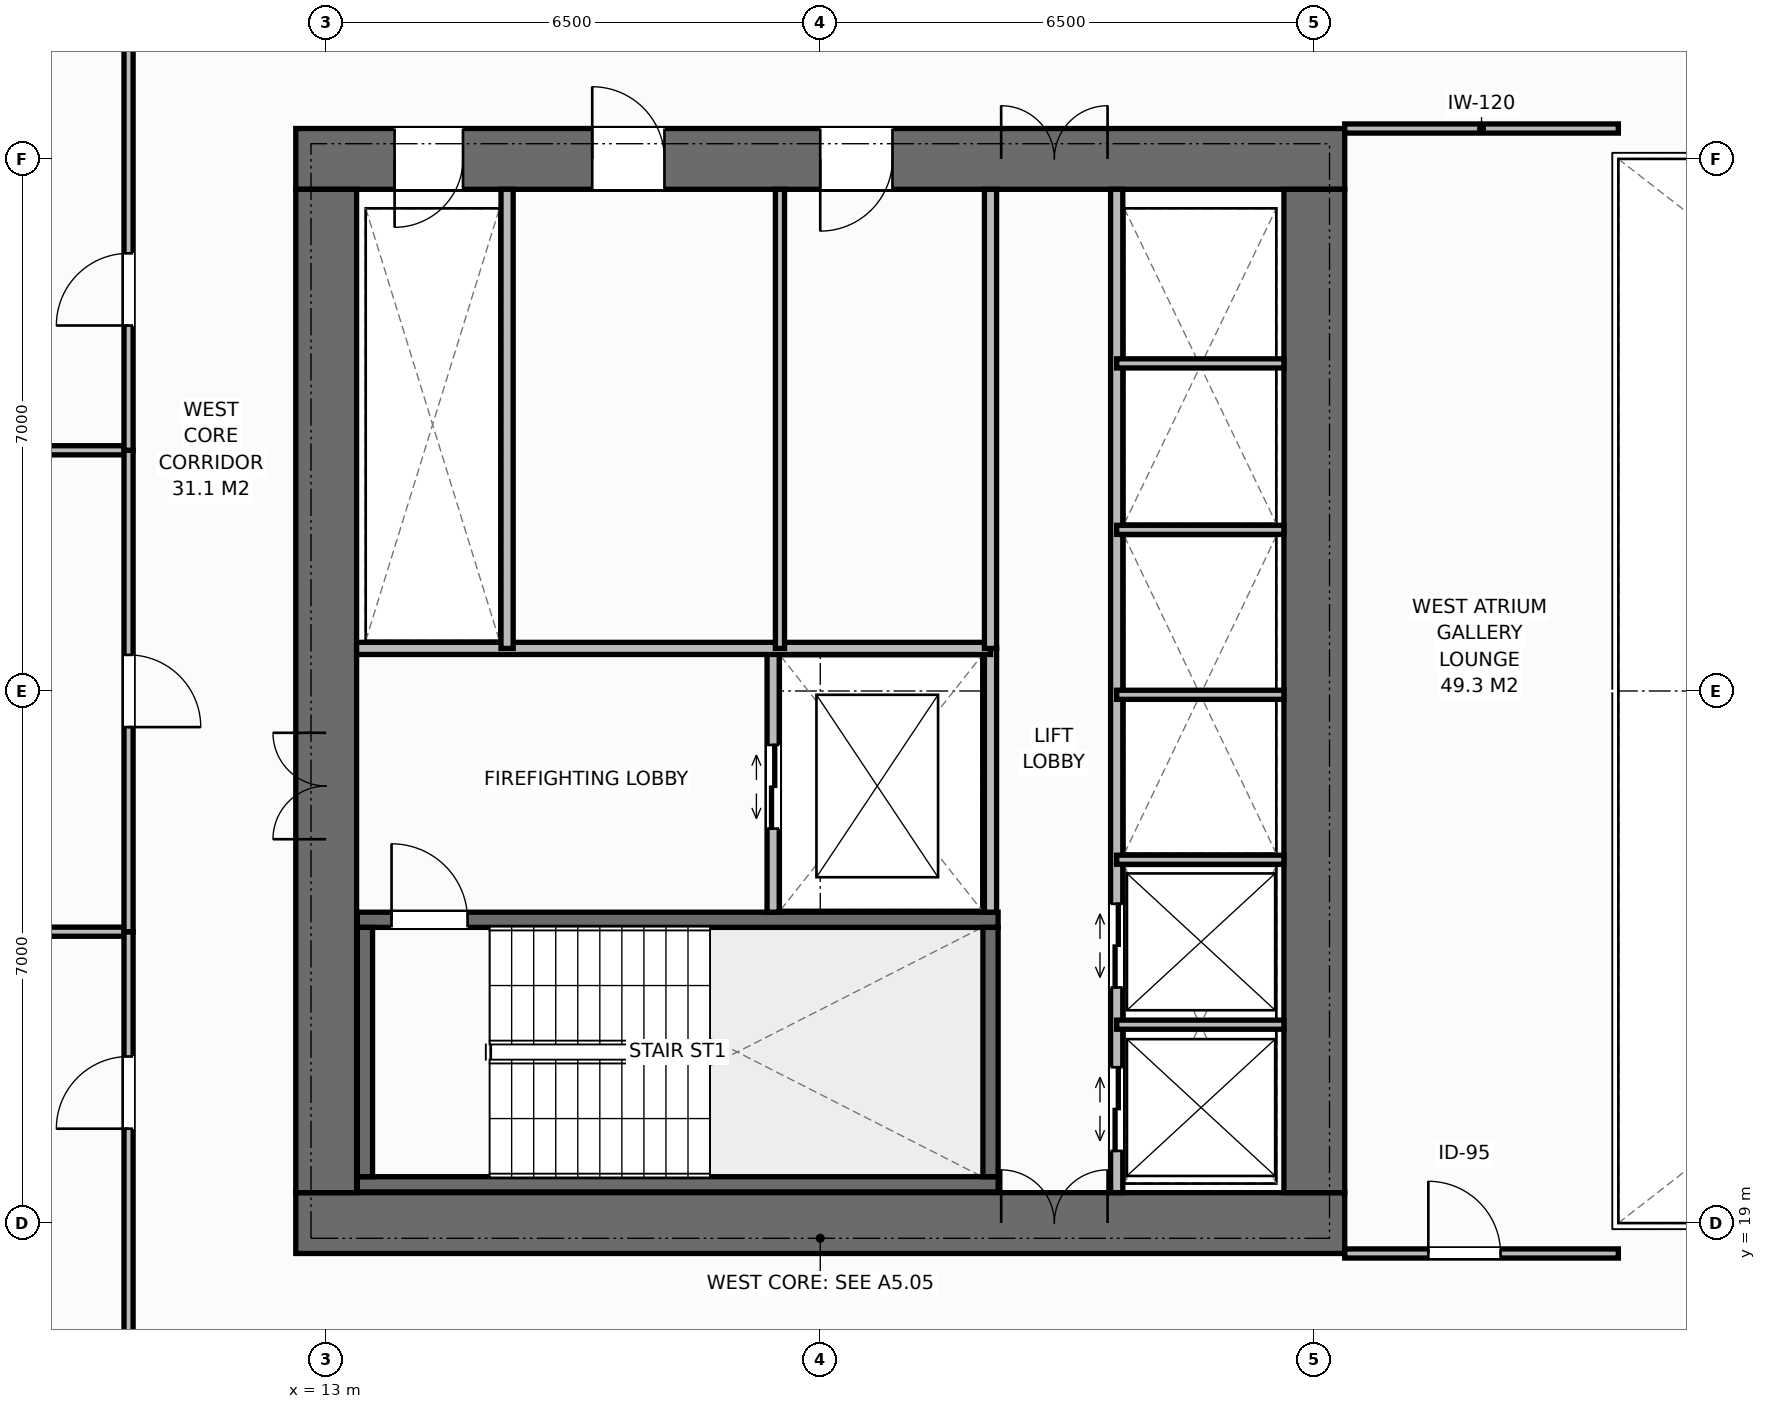
"""IFC4 building model, lengths in metres.
Left out: names, types, materials, properties, quantities, classifications, styles, units other than length and angle.
Written with IfcOpenShell. Run it as: python <this file> out.ifc"""

import sys

from ifc_helpers import new_model, si_unit, direction, frame, frame_2d, origin, place, context, subcontext, project, spatial, rectangle, extrude, element, fill, save


model = new_model("IFC4")
c1 = context("Model", 3, precision=1e-05, world=origin(), true_north=direction((0.0, 1.0)))
c2 = subcontext(c1, "Body", "Model", "MODEL_VIEW")
j1 = project(units=[si_unit("LENGTHUNIT", "METRE"), si_unit("PLANEANGLEUNIT", "RADIAN")], contexts=[c1])
p1 = place(None, origin())
s1 = spatial("IfcSite", under=j1, at=p1, CompositionType="ELEMENT")
p2 = place(p1, origin())
s2 = spatial("IfcBuilding", under=s1, at=p2, CompositionType="ELEMENT")
p3 = place(p2, frame((0.0, 0.0, 54.4)))
s3 = spatial("IfcBuildingStorey", under=s2, at=p3, CompositionType="ELEMENT", Elevation=54.4)
p4 = place(p3, frame((12.6, 19.0, 0.0), z_axis=(0.0, 0.0, 1.0), x_axis=(1.0, 0.0, 0.0)))
e1 = element("IfcWall", 1, at=p4, inside=s3, PredefinedType="SHEAR", context=c2, shape_type="SweptSolid", body=[
    extrude(rectangle(XDim=13.8, YDim=0.8, at=frame_2d((6.9, 0.0))), origin(), (0.0, 0.0, 1.0), 3.8),
])
p5 = place(p4, frame((9.28, 0.0, 0.0)))
e2 = element("IfcOpeningElement", 2, at=p5, cuts=e1, PredefinedType="OPENING", context=c2, shape_type="SweptSolid", body=[
    extrude(rectangle(XDim=1.4, YDim=2.2, at=frame_2d((0.7, 1.1))), frame((0.0, 0.41, 0.0), z_axis=(0.0, -1.0, 0.0), x_axis=(1.0, 0.0, 0.0)), (0.0, 0.0, 1.0), 0.82),
])
p6 = place(p3, frame((12.6, 33.0, 0.0), z_axis=(0.0, 0.0, 1.0), x_axis=(1.0, 0.0, 0.0)))
e3 = element("IfcWall", 3, at=p6, inside=s3, PredefinedType="SHEAR", context=c2, shape_type="SweptSolid", body=[
    extrude(rectangle(XDim=13.8, YDim=0.8, at=frame_2d((6.9, 0.0))), origin(), (0.0, 0.0, 1.0), 3.8),
])
p7 = place(p6, frame((1.3, 0.0, 0.0)))
e4 = element("IfcOpeningElement", 4, at=p7, cuts=e3, PredefinedType="OPENING", context=c2, shape_type="SweptSolid", body=[
    extrude(rectangle(XDim=0.9, YDim=2.15, at=frame_2d((0.45, 1.075))), frame((0.0, 0.41, 0.0), z_axis=(0.0, -1.0, 0.0), x_axis=(1.0, 0.0, 0.0)), (0.0, 0.0, 1.0), 0.82),
])
p8 = place(p6, frame((3.9, 0.0, 0.0)))
e5 = element("IfcOpeningElement", 5, at=p8, cuts=e3, PredefinedType="OPENING", context=c2, shape_type="SweptSolid", body=[
    extrude(rectangle(XDim=0.95, YDim=2.15, at=frame_2d((0.475, 1.075))), frame((0.0, 0.41, 0.0), z_axis=(0.0, -1.0, 0.0), x_axis=(1.0, 0.0, 0.0)), (0.0, 0.0, 1.0), 0.82),
])
p9 = place(p6, frame((6.9, 0.0, 0.0)))
e6 = element("IfcOpeningElement", 6, at=p9, cuts=e3, PredefinedType="OPENING", context=c2, shape_type="SweptSolid", body=[
    extrude(rectangle(XDim=0.95, YDim=2.15, at=frame_2d((0.475, 1.075))), frame((0.0, 0.41, 0.0), z_axis=(0.0, -1.0, 0.0), x_axis=(1.0, 0.0, 0.0)), (0.0, 0.0, 1.0), 0.82),
])
p10 = place(p6, frame((9.28, 0.0, 0.0)))
e7 = element("IfcOpeningElement", 7, at=p10, cuts=e3, PredefinedType="OPENING", context=c2, shape_type="SweptSolid", body=[
    extrude(rectangle(XDim=1.4, YDim=2.2, at=frame_2d((0.7, 1.1))), frame((0.0, 0.41, 0.0), z_axis=(0.0, -1.0, 0.0), x_axis=(1.0, 0.0, 0.0)), (0.0, 0.0, 1.0), 0.82),
])
p11 = place(p3, frame((13.0, 19.4, 0.0), z_axis=(0.0, 0.0, 1.0), x_axis=(0.0, 1.0, 0.0)))
e8 = element("IfcWall", 8, at=p11, inside=s3, PredefinedType="SHEAR", context=c2, shape_type="SweptSolid", body=[
    extrude(rectangle(XDim=13.2, YDim=0.8, at=frame_2d((6.6, 0.0))), origin(), (0.0, 0.0, 1.0), 3.8),
])
p12 = place(p11, frame((4.65, 0.0, 0.0)))
e9 = element("IfcOpeningElement", 9, at=p12, cuts=e8, PredefinedType="OPENING", context=c2, shape_type="SweptSolid", body=[
    extrude(rectangle(XDim=1.4, YDim=2.2, at=frame_2d((0.7, 1.1))), frame((0.0, 0.41, 0.0), z_axis=(0.0, -1.0, 0.0), x_axis=(1.0, 0.0, 0.0)), (0.0, 0.0, 1.0), 0.82),
])
p13 = place(p3, frame((26.0, 19.4, 0.0), z_axis=(0.0, 0.0, 1.0), x_axis=(0.0, 1.0, 0.0)))
e10 = element("IfcWall", 10, at=p13, inside=s3, PredefinedType="SHEAR", context=c2, shape_type="SweptSolid", body=[
    extrude(rectangle(XDim=13.2, YDim=0.8, at=frame_2d((6.6, 0.0))), origin(), (0.0, 0.0, 1.0), 3.8),
])
p14 = place(p3, frame((13.41, 19.51, 0.0), z_axis=(0.0, 0.0, 1.0), x_axis=(1.0, 0.0, 0.0)))
e11 = element("IfcWall", 11, at=p14, inside=s3, PredefinedType="SHEAR", context=c2, shape_type="SweptSolid", body=[
    extrude(rectangle(XDim=8.43, YDim=0.2, at=frame_2d((4.215, 0.0))), origin(), (0.0, 0.0, 1.0), 3.8),
])
p15 = place(p3, frame((13.41, 22.99, 0.0), z_axis=(0.0, 0.0, 1.0), x_axis=(1.0, 0.0, 0.0)))
e12 = element("IfcWall", 12, at=p15, inside=s3, PredefinedType="SHEAR", context=c2, shape_type="SweptSolid", body=[
    extrude(rectangle(XDim=8.43, YDim=0.2, at=frame_2d((4.215, 0.0))), origin(), (0.0, 0.0, 1.0), 3.8),
])
p16 = place(p15, frame((0.45, 0.0, 0.0)))
e13 = element("IfcOpeningElement", 13, at=p16, cuts=e12, PredefinedType="OPENING", context=c2, shape_type="SweptSolid", body=[
    extrude(rectangle(XDim=1.0, YDim=2.15, at=frame_2d((0.5, 1.075))), frame((0.0, 0.11, 0.0), z_axis=(0.0, -1.0, 0.0), x_axis=(1.0, 0.0, 0.0)), (0.0, 0.0, 1.0), 0.22),
])
for number, where, z_axis, x_axis in (
    (14, (13.51, 19.61, 0.0), (0.0, 0.0, 1.0), (0.0, 1.0, 0.0)),
    (15, (21.74, 19.61, 0.0), (0.0, 0.0, 1.0), (0.0, 1.0, 0.0)),
):
    element("IfcWall", number, at=place(p3, frame(where, z_axis=z_axis, x_axis=x_axis)), inside=s3, PredefinedType="SHEAR", context=c2, shape_type="SweptSolid", body=[
        extrude(rectangle(XDim=3.28, YDim=0.2, at=frame_2d((1.64, 0.0))), origin(), (0.0, 0.0, 1.0), 3.8),
    ])
p17 = place(p3, frame((21.74, 23.09, 0.0), z_axis=(0.0, 0.0, 1.0), x_axis=(0.0, 1.0, 0.0)))
e16 = element("IfcWall", 16, at=p17, inside=s3, PredefinedType="STANDARD", context=c2, shape_type="SweptSolid", body=[
    extrude(rectangle(XDim=3.47, YDim=0.16, at=frame_2d((1.735, 0.0))), origin(), (0.0, 0.0, 1.0), 3.55),
])
p18 = place(p3, frame((18.88, 23.09, 0.0), z_axis=(0.0, 0.0, 1.0), x_axis=(0.0, 1.0, 0.0)))
e17 = element("IfcWall", 17, at=p18, inside=s3, PredefinedType="STANDARD", context=c2, shape_type="SweptSolid", body=[
    extrude(rectangle(XDim=3.47, YDim=0.16, at=frame_2d((1.735, 0.0))), origin(), (0.0, 0.0, 1.0), 3.55),
])
p19 = place(p18, frame((1.1, 0.0, 0.0)))
e18 = element("IfcOpeningElement", 18, at=p19, cuts=e17, PredefinedType="OPENING", context=c2, shape_type="SweptSolid", body=[
    extrude(rectangle(XDim=1.1, YDim=2.2, at=frame_2d((0.55, 1.1))), frame((0.0, 0.09, 0.0), z_axis=(0.0, -1.0, 0.0), x_axis=(1.0, 0.0, 0.0)), (0.0, 0.0, 1.0), 0.18),
])
p20 = place(p3, frame((13.4, 26.56, 0.0), z_axis=(0.0, 0.0, 1.0), x_axis=(1.0, 0.0, 0.0)))
e19 = element("IfcWall", 19, at=p20, inside=s3, PredefinedType="STANDARD", context=c2, shape_type="SweptSolid", body=[
    extrude(rectangle(XDim=8.34, YDim=0.16, at=frame_2d((4.17, 0.0))), origin(), (0.0, 0.0, 1.0), 3.55),
])
p21 = place(p3, frame((15.38, 26.56, 0.0), z_axis=(0.0, 0.0, 1.0), x_axis=(0.0, 1.0, 0.0)))
e20 = element("IfcWall", 20, at=p21, inside=s3, PredefinedType="STANDARD", context=c2, shape_type="SweptSolid", body=[
    extrude(rectangle(XDim=6.04, YDim=0.16, at=frame_2d((3.02, 0.0))), origin(), (0.0, 0.0, 1.0), 3.55),
])
p22 = place(p3, frame((18.97, 26.56, 0.0), z_axis=(0.0, 0.0, 1.0), x_axis=(0.0, 1.0, 0.0)))
e21 = element("IfcWall", 21, at=p22, inside=s3, PredefinedType="PARTITIONING", context=c2, shape_type="SweptSolid", body=[
    extrude(rectangle(XDim=6.04, YDim=0.12, at=frame_2d((3.02, 0.0))), origin(), (0.0, 0.0, 1.0), 3.55),
])
p23 = place(p3, frame((21.74, 26.56, 0.0), z_axis=(0.0, 0.0, 1.0), x_axis=(0.0, 1.0, 0.0)))
e22 = element("IfcWall", 22, at=p23, inside=s3, PredefinedType="STANDARD", context=c2, shape_type="SweptSolid", body=[
    extrude(rectangle(XDim=6.04, YDim=0.16, at=frame_2d((3.02, 0.0))), origin(), (0.0, 0.0, 1.0), 3.55),
])
p24 = place(p3, frame((23.4, 19.4, 0.0), z_axis=(0.0, 0.0, 1.0), x_axis=(0.0, 1.0, 0.0)))
e23 = element("IfcWall", 23, at=p24, inside=s3, PredefinedType="STANDARD", context=c2, shape_type="SweptSolid", body=[
    extrude(rectangle(XDim=13.2, YDim=0.16, at=frame_2d((6.6, 0.0))), origin(), (0.0, 0.0, 1.0), 3.55),
])
p25 = place(p24, frame((0.55, 0.0, 0.0)))
e24 = element("IfcOpeningElement", 24, at=p25, cuts=e23, PredefinedType="OPENING", context=c2, shape_type="SweptSolid", body=[
    extrude(rectangle(XDim=1.1, YDim=2.2, at=frame_2d((0.55, 1.1))), frame((0.0, 0.09, 0.0), z_axis=(0.0, -1.0, 0.0), x_axis=(1.0, 0.0, 0.0)), (0.0, 0.0, 1.0), 0.18),
])
p26 = place(p24, frame((2.7, 0.0, 0.0)))
e25 = element("IfcOpeningElement", 25, at=p26, cuts=e23, PredefinedType="OPENING", context=c2, shape_type="SweptSolid", body=[
    extrude(rectangle(XDim=1.1, YDim=2.2, at=frame_2d((0.55, 1.1))), frame((0.0, 0.09, 0.0), z_axis=(0.0, -1.0, 0.0), x_axis=(1.0, 0.0, 0.0)), (0.0, 0.0, 1.0), 0.18),
])
for number, where, z_axis, x_axis in (
    (26, (23.4, 21.61, 0.0), (0.0, 0.0, 1.0), (1.0, 0.0, 0.0)),
    (27, (23.4, 23.78, 0.0), (0.0, 0.0, 1.0), (1.0, 0.0, 0.0)),
    (28, (23.4, 25.95, 0.0), (0.0, 0.0, 1.0), (1.0, 0.0, 0.0)),
    (29, (23.4, 28.12, 0.0), (0.0, 0.0, 1.0), (1.0, 0.0, 0.0)),
    (30, (23.4, 30.31, 0.0), (0.0, 0.0, 1.0), (1.0, 0.0, 0.0)),
):
    element("IfcWall", number, at=place(p3, frame(where, z_axis=z_axis, x_axis=x_axis)), inside=s3, PredefinedType="PARTITIONING", context=c2, shape_type="SweptSolid", body=[
        extrude(rectangle(XDim=2.2, YDim=0.12, at=frame_2d((1.1, 0.0))), origin(), (0.0, 0.0, 1.0), 3.55),
    ])
p27 = place(p3, frame((26.4, 33.4, 0.0), z_axis=(0.0, 0.0, 1.0), x_axis=(1.0, 0.0, 0.0)))
e31 = element("IfcWall", 31, at=p27, inside=s3, PredefinedType="PARTITIONING", context=c2, shape_type="SweptSolid", body=[
    extrude(rectangle(XDim=3.6, YDim=0.12, at=frame_2d((1.8, 0.0))), origin(), (0.0, 0.0, 1.0), 3.55),
])
p28 = place(p3, frame((26.4, 18.6, 0.0), z_axis=(0.0, 0.0, 1.0), x_axis=(1.0, 0.0, 0.0)))
e32 = element("IfcWall", 32, at=p28, inside=s3, PredefinedType="PARTITIONING", context=c2, shape_type="SweptSolid", body=[
    extrude(rectangle(XDim=3.6, YDim=0.12, at=frame_2d((1.8, 0.0))), origin(), (0.0, 0.0, 1.0), 3.55),
])
p29 = place(p28, frame((1.1, 0.0, 0.0)))
e33 = element("IfcOpeningElement", 33, at=p29, cuts=e32, PredefinedType="OPENING", context=c2, shape_type="SweptSolid", body=[
    extrude(rectangle(XDim=0.95, YDim=2.15, at=frame_2d((0.475, 1.075))), frame((0.0, 0.07, 0.0), z_axis=(0.0, -1.0, 0.0), x_axis=(1.0, 0.0, 0.0)), (0.0, 0.0, 1.0), 0.14),
])
p30 = place(p3, frame((-0.18, 22.833, 0.0), z_axis=(0.0, 0.0, 1.0), x_axis=(1.0, 0.0, 0.0)))
e34 = element("IfcWall", 34, at=p30, inside=s3, PredefinedType="PARTITIONING", context=c2, shape_type="SweptSolid", body=[
    extrude(rectangle(XDim=10.58, YDim=0.12, at=frame_2d((5.29, 0.0))), origin(), (0.0, 0.0, 1.0), 3.55),
])
p31 = place(p3, frame((10.4, 16.5, 0.0), z_axis=(0.0, 0.0, 1.0), x_axis=(0.0, 1.0, 0.0)))
e35 = element("IfcWall", 35, at=p31, inside=s3, PredefinedType="PARTITIONING", context=c2, shape_type="SweptSolid", body=[
    extrude(rectangle(XDim=6.333, YDim=0.12, at=frame_2d((3.167, 0.0))), origin(), (0.0, 0.0, 1.0), 3.55),
])
p32 = place(p31, frame((3.742, 0.0, 0.0)))
e36 = element("IfcOpeningElement", 36, at=p32, cuts=e35, PredefinedType="OPENING", context=c2, shape_type="SweptSolid", body=[
    extrude(rectangle(XDim=0.95, YDim=2.15, at=frame_2d((0.475, 1.075))), frame((0.0, 0.07, 0.0), z_axis=(0.0, -1.0, 0.0), x_axis=(1.0, 0.0, 0.0)), (0.0, 0.0, 1.0), 0.14),
])
p33 = place(p3, frame((-0.18, 29.167, 0.0), z_axis=(0.0, 0.0, 1.0), x_axis=(1.0, 0.0, 0.0)))
e37 = element("IfcWall", 37, at=p33, inside=s3, PredefinedType="PARTITIONING", context=c2, shape_type="SweptSolid", body=[
    extrude(rectangle(XDim=10.58, YDim=0.12, at=frame_2d((5.29, 0.0))), origin(), (0.0, 0.0, 1.0), 3.55),
])
p34 = place(p3, frame((10.4, 22.833, 0.0), z_axis=(0.0, 0.0, 1.0), x_axis=(0.0, 1.0, 0.0)))
e38 = element("IfcWall", 38, at=p34, inside=s3, PredefinedType="PARTITIONING", context=c2, shape_type="SweptSolid", body=[
    extrude(rectangle(XDim=6.333, YDim=0.12, at=frame_2d((3.167, 0.0))), origin(), (0.0, 0.0, 1.0), 3.55),
])
p35 = place(p34, frame((2.692, 0.0, 0.0)))
e39 = element("IfcOpeningElement", 39, at=p35, cuts=e38, PredefinedType="OPENING", context=c2, shape_type="SweptSolid", body=[
    extrude(rectangle(XDim=0.95, YDim=2.15, at=frame_2d((0.475, 1.075))), frame((0.0, 0.07, 0.0), z_axis=(0.0, -1.0, 0.0), x_axis=(1.0, 0.0, 0.0)), (0.0, 0.0, 1.0), 0.14),
])
p36 = place(p3, frame((10.4, 29.167, 0.0), z_axis=(0.0, 0.0, 1.0), x_axis=(0.0, 1.0, 0.0)))
e40 = element("IfcWall", 40, at=p36, inside=s3, PredefinedType="PARTITIONING", context=c2, shape_type="SweptSolid", body=[
    extrude(rectangle(XDim=6.333, YDim=0.12, at=frame_2d((3.167, 0.0))), origin(), (0.0, 0.0, 1.0), 3.55),
])
p37 = place(p36, frame((1.642, 0.0, 0.0)))
e41 = element("IfcOpeningElement", 41, at=p37, cuts=e40, PredefinedType="OPENING", context=c2, shape_type="SweptSolid", body=[
    extrude(rectangle(XDim=0.95, YDim=2.15, at=frame_2d((0.475, 1.075))), frame((0.0, 0.07, 0.0), z_axis=(0.0, -1.0, 0.0), x_axis=(1.0, 0.0, 0.0)), (0.0, 0.0, 1.0), 0.14),
])
p38 = place(p16, origin())
e42 = element("IfcDoor", 42, at=p38, inside=s3, OperationType="SINGLE_SWING_LEFT", PredefinedType="DOOR", context=c2, shape_type="SweptSolid", body=[
    extrude(rectangle(XDim=1.0, YDim=2.15, at=frame_2d((0.5, 1.075))), frame((0.0, 0.025, 0.0), z_axis=(0.0, -1.0, 0.0), x_axis=(1.0, 0.0, 0.0)), (0.0, 0.0, 1.0), 0.05),
])
fill(e13, e42)
p39 = place(p12, origin())
e43 = element("IfcDoor", 43, at=p39, inside=s3, OperationType="DOUBLE_DOOR_SINGLE_SWING", PredefinedType="DOOR", context=c2, shape_type="SweptSolid", body=[
    extrude(rectangle(XDim=1.4, YDim=2.2, at=frame_2d((0.7, 1.1))), frame((0.0, 0.025, 0.0), z_axis=(0.0, -1.0, 0.0), x_axis=(1.0, 0.0, 0.0)), (0.0, 0.0, 1.0), 0.05),
])
fill(e9, e43)
p40 = place(p19, origin())
e44 = element("IfcDoor", 44, at=p40, inside=s3, OperationType="DOUBLE_DOOR_SLIDING", PredefinedType="DOOR", context=c2, shape_type="SweptSolid", body=[
    extrude(rectangle(XDim=1.1, YDim=2.2, at=frame_2d((0.55, 1.1))), frame((0.0, 0.025, 0.0), z_axis=(0.0, -1.0, 0.0), x_axis=(1.0, 0.0, 0.0)), (0.0, 0.0, 1.0), 0.05),
])
fill(e18, e44)
p41 = place(p7, origin())
e45 = element("IfcDoor", 45, at=p41, inside=s3, OperationType="SINGLE_SWING_RIGHT", PredefinedType="DOOR", context=c2, shape_type="SweptSolid", body=[
    extrude(rectangle(XDim=0.9, YDim=2.15, at=frame_2d((0.45, 1.075))), frame((0.0, -0.075, 0.0), z_axis=(0.0, -1.0, 0.0), x_axis=(1.0, 0.0, 0.0)), (0.0, 0.0, 1.0), 0.05),
])
fill(e4, e45)
p42 = place(p8, origin())
e46 = element("IfcDoor", 46, at=p42, inside=s3, OperationType="SINGLE_SWING_LEFT", PredefinedType="DOOR", context=c2, shape_type="SweptSolid", body=[
    extrude(rectangle(XDim=0.95, YDim=2.15, at=frame_2d((0.475, 1.075))), frame((0.0, -0.075, 0.0), z_axis=(0.0, -1.0, 0.0), x_axis=(1.0, 0.0, 0.0)), (0.0, 0.0, 1.0), 0.05),
])
fill(e5, e46)
p43 = place(p9, origin())
e47 = element("IfcDoor", 47, at=p43, inside=s3, OperationType="SINGLE_SWING_RIGHT", PredefinedType="DOOR", context=c2, shape_type="SweptSolid", body=[
    extrude(rectangle(XDim=0.95, YDim=2.15, at=frame_2d((0.475, 1.075))), frame((0.0, -0.075, 0.0), z_axis=(0.0, -1.0, 0.0), x_axis=(1.0, 0.0, 0.0)), (0.0, 0.0, 1.0), 0.05),
])
fill(e6, e47)
p44 = place(p5, origin())
e48 = element("IfcDoor", 48, at=p44, inside=s3, OperationType="DOUBLE_DOOR_SINGLE_SWING", PredefinedType="DOOR", context=c2, shape_type="SweptSolid", body=[
    extrude(rectangle(XDim=1.4, YDim=2.2, at=frame_2d((0.7, 1.1))), frame((0.0, 0.125, 0.0), z_axis=(0.0, -1.0, 0.0), x_axis=(1.0, 0.0, 0.0)), (0.0, 0.0, 1.0), 0.05),
])
fill(e2, e48)
p45 = place(p10, origin())
e49 = element("IfcDoor", 49, at=p45, inside=s3, OperationType="DOUBLE_DOOR_SINGLE_SWING", PredefinedType="DOOR", context=c2, shape_type="SweptSolid", body=[
    extrude(rectangle(XDim=1.4, YDim=2.2, at=frame_2d((0.7, 1.1))), frame((0.0, -0.075, 0.0), z_axis=(0.0, -1.0, 0.0), x_axis=(1.0, 0.0, 0.0)), (0.0, 0.0, 1.0), 0.05),
])
fill(e7, e49)
p46 = place(p25, origin())
e50 = element("IfcDoor", 50, at=p46, inside=s3, OperationType="DOUBLE_DOOR_SLIDING", PredefinedType="DOOR", context=c2, shape_type="SweptSolid", body=[
    extrude(rectangle(XDim=1.1, YDim=2.2, at=frame_2d((0.55, 1.1))), frame((0.0, 0.025, 0.0), z_axis=(0.0, -1.0, 0.0), x_axis=(1.0, 0.0, 0.0)), (0.0, 0.0, 1.0), 0.05),
])
fill(e24, e50)
p47 = place(p26, origin())
e51 = element("IfcDoor", 51, at=p47, inside=s3, OperationType="DOUBLE_DOOR_SLIDING", PredefinedType="DOOR", context=c2, shape_type="SweptSolid", body=[
    extrude(rectangle(XDim=1.1, YDim=2.2, at=frame_2d((0.55, 1.1))), frame((0.0, 0.025, 0.0), z_axis=(0.0, -1.0, 0.0), x_axis=(1.0, 0.0, 0.0)), (0.0, 0.0, 1.0), 0.05),
])
fill(e25, e51)
p48 = place(p29, origin())
e52 = element("IfcDoor", 52, at=p48, inside=s3, OperationType="SINGLE_SWING_LEFT", PredefinedType="DOOR", context=c2, shape_type="SweptSolid", body=[
    extrude(rectangle(XDim=0.95, YDim=2.15, at=frame_2d((0.475, 1.075))), frame((0.0, 0.025, 0.0), z_axis=(0.0, -1.0, 0.0), x_axis=(1.0, 0.0, 0.0)), (0.0, 0.0, 1.0), 0.05),
])
fill(e33, e52)
p49 = place(p32, origin())
e53 = element("IfcDoor", 53, at=p49, inside=s3, OperationType="SINGLE_SWING_LEFT", PredefinedType="DOOR", context=c2, shape_type="SweptSolid", body=[
    extrude(rectangle(XDim=0.95, YDim=2.15, at=frame_2d((0.475, 1.075))), frame((0.0, 0.025, 0.0), z_axis=(0.0, -1.0, 0.0), x_axis=(1.0, 0.0, 0.0)), (0.0, 0.0, 1.0), 0.05),
])
fill(e36, e53)
p50 = place(p35, origin())
e54 = element("IfcDoor", 54, at=p50, inside=s3, OperationType="SINGLE_SWING_RIGHT", PredefinedType="DOOR", context=c2, shape_type="SweptSolid", body=[
    extrude(rectangle(XDim=0.95, YDim=2.15, at=frame_2d((0.475, 1.075))), frame((0.0, 0.025, 0.0), z_axis=(0.0, -1.0, 0.0), x_axis=(1.0, 0.0, 0.0)), (0.0, 0.0, 1.0), 0.05),
])
fill(e39, e54)
p51 = place(p37, origin())
e55 = element("IfcDoor", 55, at=p51, inside=s3, OperationType="SINGLE_SWING_LEFT", PredefinedType="DOOR", context=c2, shape_type="SweptSolid", body=[
    extrude(rectangle(XDim=0.95, YDim=2.15, at=frame_2d((0.475, 1.075))), frame((0.0, 0.025, 0.0), z_axis=(0.0, -1.0, 0.0), x_axis=(1.0, 0.0, 0.0)), (0.0, 0.0, 1.0), 0.05),
])
fill(e41, e55)
save(model, sys.argv[1])
